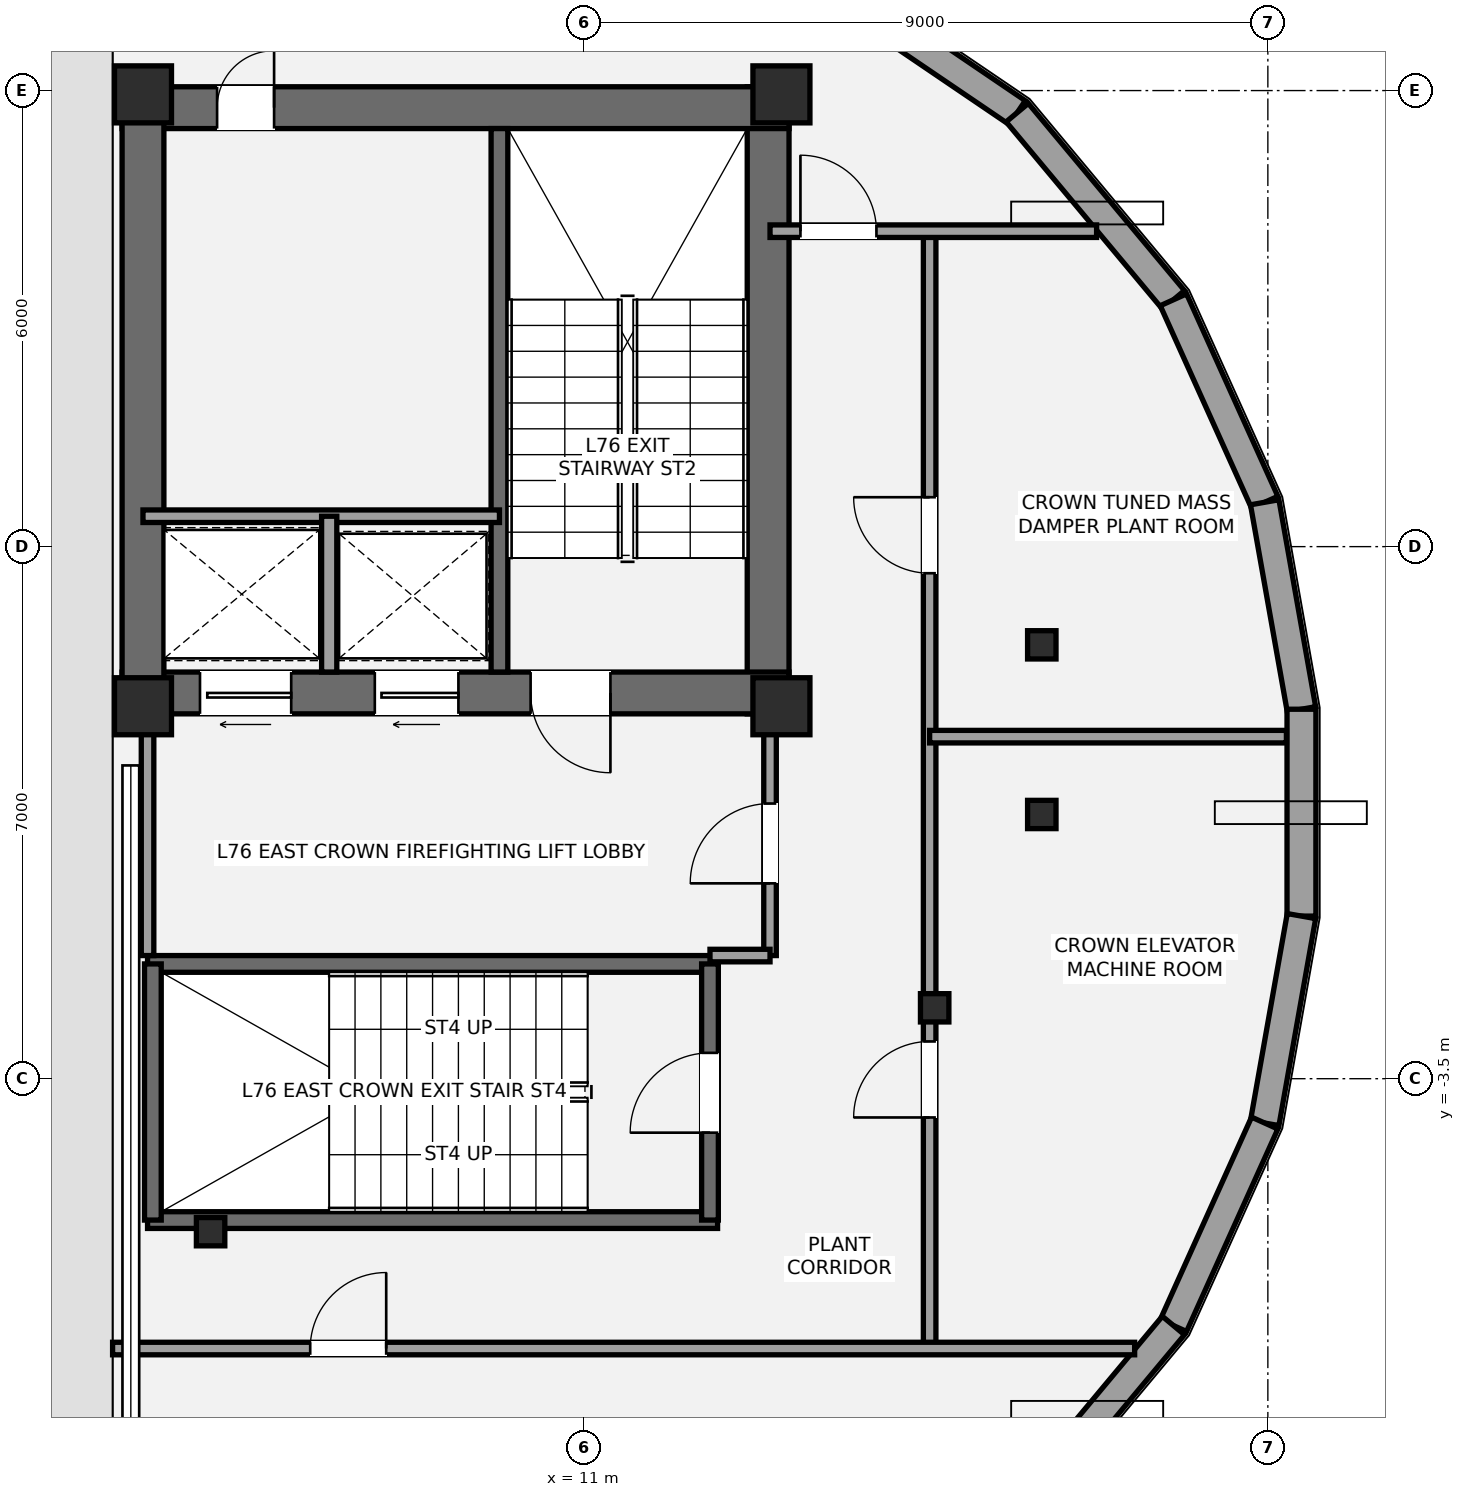
"""IFC4 building model, lengths in metres.
Left out: names, types, materials, properties, quantities, classifications, styles, units other than length and angle.
Written with IfcOpenShell. Run it as: python <this file> out.ifc"""

import sys

from ifc_helpers import new_model, si_unit, direction, frame, frame_2d, origin, origin_2d, place, context, subcontext, project, spatial, rectangle, i_section, extrude, element, fill, save


model = new_model("IFC4")
c1 = context("Model", 3, precision=1e-05, world=origin(), true_north=direction((0.0, 1.0)))
c2 = subcontext(c1, "Body", "Model", "MODEL_VIEW")
j1 = project(units=[si_unit("LENGTHUNIT", "METRE"), si_unit("PLANEANGLEUNIT", "RADIAN")], contexts=[c1])
p1 = place(None, origin())
s1 = spatial("IfcSite", under=j1, at=p1, CompositionType="ELEMENT")
p2 = place(p1, origin())
s2 = spatial("IfcBuilding", under=s1, at=p2, CompositionType="ELEMENT")
p3 = place(p2, frame((0.0, 0.0, 269.2)))
s3 = spatial("IfcBuildingStorey", under=s2, at=p3, CompositionType="ELEMENT", Elevation=269.2)
p4 = place(p3, frame((13.425, 1.3, 0.0), z_axis=(0.0, 0.0, 1.0), x_axis=(0.0, 1.0, 0.0)))
e1 = element("IfcWall", 1, at=p4, inside=s3, PredefinedType="SHEAR", context=c2, shape_type="SweptSolid", body=[
    extrude(rectangle(XDim=8.25, YDim=0.55, at=frame_2d((4.125, 0.0))), origin(), (0.0, 0.0, 1.0), 3.8),
])
p5 = place(p3, frame((4.925, 9.275, 0.0), z_axis=(0.0, 0.0, 1.0), x_axis=(1.0, 0.0, 0.0)))
e2 = element("IfcWall", 2, at=p5, inside=s3, PredefinedType="SHEAR", context=c2, shape_type="SweptSolid", body=[
    extrude(rectangle(XDim=8.775, YDim=0.55, at=frame_2d((4.387, 0.0))), origin(), (0.0, 0.0, 1.0), 3.8),
])
p6 = place(p5, frame((1.25, 0.0, 0.0)))
e3 = element("IfcOpeningElement", 3, at=p6, cuts=e2, PredefinedType="OPENING", context=c2, shape_type="SweptSolid", body=[
    extrude(rectangle(XDim=0.75, YDim=2.1, at=frame_2d((0.375, 1.05))), frame((0.0, 0.285, 0.0), z_axis=(0.0, -1.0, 0.0), x_axis=(1.0, 0.0, 0.0)), (0.0, 0.0, 1.0), 0.57),
])
p7 = place(p3, frame((13.7, 1.575, 0.0), z_axis=(0.0, 0.0, 1.0), x_axis=(-1.0, 0.0, 0.0)))
e4 = element("IfcWall", 4, at=p7, inside=s3, PredefinedType="SHEAR", context=c2, shape_type="SweptSolid", body=[
    extrude(rectangle(XDim=8.775, YDim=0.55, at=frame_2d((4.387, 0.0))), origin(), (0.0, 0.0, 1.0), 3.8),
])
p8 = place(p7, frame((2.35, 0.0, 0.0)))
e5 = element("IfcOpeningElement", 5, at=p8, cuts=e4, PredefinedType="OPENING", context=c2, shape_type="SweptSolid", body=[
    extrude(rectangle(XDim=1.05, YDim=2.15, at=frame_2d((0.525, 1.075))), frame((0.0, 0.285, 0.0), z_axis=(0.0, -1.0, 0.0), x_axis=(1.0, 0.0, 0.0)), (0.0, 0.0, 1.0), 0.57),
])
p9 = place(p7, frame((6.55, 0.0, 0.0)))
e6 = element("IfcOpeningElement", 6, at=p9, cuts=e4, PredefinedType="OPENING", context=c2, shape_type="SweptSolid", body=[
    extrude(rectangle(XDim=1.2, YDim=2.2, at=frame_2d((0.6, 1.1))), frame((0.0, 0.285, 0.0), z_axis=(0.0, -1.0, 0.0), x_axis=(1.0, 0.0, 0.0)), (0.0, 0.0, 1.0), 0.57),
])
p10 = place(p7, frame((4.35, 0.0, 0.0)))
e7 = element("IfcOpeningElement", 7, at=p10, cuts=e4, PredefinedType="OPENING", context=c2, shape_type="SweptSolid", body=[
    extrude(rectangle(XDim=1.1, YDim=2.2, at=frame_2d((0.55, 1.1))), frame((0.0, 0.285, 0.0), z_axis=(0.0, -1.0, 0.0), x_axis=(1.0, 0.0, 0.0)), (0.0, 0.0, 1.0), 0.57),
])
p11 = place(p3, frame((5.2, 1.3, 0.0), z_axis=(0.0, 0.0, 1.0), x_axis=(0.0, 1.0, 0.0)))
e8 = element("IfcWall", 8, at=p11, inside=s3, PredefinedType="SHEAR", context=c2, shape_type="SweptSolid", body=[
    extrude(rectangle(XDim=8.25, YDim=0.55, at=frame_2d((4.125, 0.0))), origin(), (0.0, 0.0, 1.0), 3.8),
])
p12 = place(p3, frame((9.89, 1.85, 0.0), z_axis=(0.0, 0.0, 1.0), x_axis=(0.0, 1.0, 0.0)))
e9 = element("IfcWall", 9, at=p12, inside=s3, PredefinedType="SHEAR", context=c2, shape_type="SweptSolid", body=[
    extrude(rectangle(XDim=7.15, YDim=0.22, at=frame_2d((3.575, 0.0))), origin(), (0.0, 0.0, 1.0), 3.8),
])
for number, where, z_axis, x_axis in (
    (10, (5.26, -1.99, 0.0), (0.0, 0.0, 1.0), (1.0, 0.0, 0.0)),
    (11, (5.26, -5.36, 0.0), (0.0, 0.0, 1.0), (1.0, 0.0, 0.0)),
):
    element("IfcWall", number, at=place(p3, frame(where, z_axis=z_axis, x_axis=x_axis)), inside=s3, PredefinedType="SHEAR", context=c2, shape_type="SweptSolid", body=[
        extrude(rectangle(XDim=7.5, YDim=0.22, at=frame_2d((3.75, 0.0))), origin(), (0.0, 0.0, 1.0), 3.8),
    ])
p13 = place(p3, frame((5.33, -5.36, 0.0), z_axis=(0.0, 0.0, 1.0), x_axis=(0.0, 1.0, 0.0)))
e12 = element("IfcWall", 12, at=p13, inside=s3, PredefinedType="SHEAR", context=c2, shape_type="SweptSolid", body=[
    extrude(rectangle(XDim=3.37, YDim=0.22, at=frame_2d((1.685, 0.0))), origin(), (0.0, 0.0, 1.0), 3.8),
])
p14 = place(p3, frame((12.66, -5.36, 0.0), z_axis=(0.0, 0.0, 1.0), x_axis=(0.0, 1.0, 0.0)))
e13 = element("IfcWall", 13, at=p14, inside=s3, PredefinedType="SHEAR", context=c2, shape_type="SweptSolid", body=[
    extrude(rectangle(XDim=3.37, YDim=0.22, at=frame_2d((1.685, 0.0))), origin(), (0.0, 0.0, 1.0), 3.8),
])
p15 = place(p14, frame((1.15, 0.0, 0.0)))
e14 = element("IfcOpeningElement", 14, at=p15, cuts=e13, PredefinedType="OPENING", context=c2, shape_type="SweptSolid", body=[
    extrude(rectangle(XDim=1.05, YDim=2.15, at=frame_2d((0.525, 1.075))), frame((0.0, 0.12, 0.0), z_axis=(0.0, -1.0, 0.0), x_axis=(1.0, 0.0, 0.0)), (0.0, 0.0, 1.0), 0.24),
])
for number, where, z_axis, x_axis in (
    (15, (5.2, 1.4, 0.0), (0.0, 0.0, 1.0), (1.0, 0.0, 0.0)),
    (16, (5.2, 9.45, 0.0), (0.0, 0.0, 1.0), (1.0, 0.0, 0.0)),
    (17, (13.6, 1.4, 0.0), (0.0, 0.0, 1.0), (1.0, 0.0, 0.0)),
    (18, (13.6, 9.45, 0.0), (0.0, 0.0, 1.0), (1.0, 0.0, 0.0)),
):
    element("IfcColumn", number, at=place(p3, frame(where, z_axis=z_axis, x_axis=x_axis)), inside=s3, PredefinedType="PILASTER", context=c2, shape_type="SweptSolid", body=[
        extrude(rectangle(XDim=0.75, YDim=0.75, at=origin_2d()), origin(), (0.0, 0.0, 1.0), 3.8),
    ])
for number, where, z_axis, x_axis in (
    (19, (17.026, 2.208, 0.0), (0.0, 0.0, 1.0), (1.0, 0.0, 0.0)),
    (20, (6.09, -5.513, 0.0), (0.0, 0.0, 1.0), (1.0, 0.0, 0.0)),
    (21, (15.616, -2.567, 0.0), (0.0, 0.0, 1.0), (1.0, 0.0, 0.0)),
    (22, (17.026, -0.024, 0.0), (0.0, 0.0, 1.0), (1.0, 0.0, 0.0)),
):
    element("IfcColumn", number, at=place(p3, frame(where, z_axis=z_axis, x_axis=x_axis)), inside=s3, PredefinedType="COLUMN", context=c2, shape_type="SweptSolid", body=[
        extrude(i_section(OverallWidth=0.374, OverallDepth=0.372, WebThickness=0.016, FlangeThickness=0.026, at=origin_2d()), origin(), (0.0, 0.0, 1.0), 3.8),
    ])
p16 = place(p3, frame((16.703, 9.21, 0.0), z_axis=(0.0, 0.0, 1.0), x_axis=(-0.827549057152, 0.56139340752, 0.0)))
e23 = element("IfcWall", 23, at=p16, inside=s3, PredefinedType="ELEMENTEDWALL", context=c2, shape_type="SweptSolid", body=[
    extrude(rectangle(XDim=3.593, YDim=0.38, at=frame_2d((1.796, 0.0))), origin(), (0.0, 0.0, 1.0), 2.97),
])
p17 = place(p3, frame((18.758, 6.748, 0.0), z_axis=(0.0, 0.0, 1.0), x_axis=(-0.640685893821, 0.76780309029, 0.0)))
e24 = element("IfcWall", 24, at=p17, inside=s3, PredefinedType="ELEMENTEDWALL", context=c2, shape_type="SweptSolid", body=[
    extrude(rectangle(XDim=3.207, YDim=0.38, at=frame_2d((1.604, 0.0))), origin(), (0.0, 0.0, 1.0), 2.97),
])
p18 = place(p3, frame((19.959, 4.083, 0.0), z_axis=(0.0, 0.0, 1.0), x_axis=(-0.411031522025, 0.911621131777, 0.0)))
e25 = element("IfcWall", 25, at=p18, inside=s3, PredefinedType="ELEMENTEDWALL", context=c2, shape_type="SweptSolid", body=[
    extrude(rectangle(XDim=2.922, YDim=0.38, at=frame_2d((1.461, 0.0))), origin(), (0.0, 0.0, 1.0), 2.97),
])
p19 = place(p3, frame((20.442, 1.361, 0.0), z_axis=(0.0, 0.0, 1.0), x_axis=(-0.174812712861, 0.984601703951, 0.0)))
e26 = element("IfcWall", 26, at=p19, inside=s3, PredefinedType="ELEMENTEDWALL", context=c2, shape_type="SweptSolid", body=[
    extrude(rectangle(XDim=2.765, YDim=0.38, at=frame_2d((1.383, 0.0))), origin(), (0.0, 0.0, 1.0), 2.97),
])
p20 = place(p3, frame((20.442, -1.361, 0.0), z_axis=(0.0, 0.0, 1.0), x_axis=(0.0, 1.0, 0.0)))
e27 = element("IfcWall", 27, at=p20, inside=s3, PredefinedType="ELEMENTEDWALL", context=c2, shape_type="SweptSolid", body=[
    extrude(rectangle(XDim=2.722, YDim=0.38, at=frame_2d((1.361, 0.0))), origin(), (0.0, 0.0, 1.0), 2.97),
])
p21 = place(p3, frame((19.959, -4.083, 0.0), z_axis=(0.0, 0.0, 1.0), x_axis=(0.174812712861, 0.984601703951, 0.0)))
e28 = element("IfcWall", 28, at=p21, inside=s3, PredefinedType="ELEMENTEDWALL", context=c2, shape_type="SweptSolid", body=[
    extrude(rectangle(XDim=2.765, YDim=0.38, at=frame_2d((1.383, 0.0))), origin(), (0.0, 0.0, 1.0), 2.97),
])
p22 = place(p3, frame((18.758, -6.748, 0.0), z_axis=(0.0, 0.0, 1.0), x_axis=(0.411031522025, 0.911621131777, 0.0)))
e29 = element("IfcWall", 29, at=p22, inside=s3, PredefinedType="ELEMENTEDWALL", context=c2, shape_type="SweptSolid", body=[
    extrude(rectangle(XDim=2.922, YDim=0.38, at=frame_2d((1.461, 0.0))), origin(), (0.0, 0.0, 1.0), 2.97),
])
p23 = place(p3, frame((16.703, -9.21, 0.0), z_axis=(0.0, 0.0, 1.0), x_axis=(0.640685893821, 0.76780309029, 0.0)))
e30 = element("IfcWall", 30, at=p23, inside=s3, PredefinedType="ELEMENTEDWALL", context=c2, shape_type="SweptSolid", body=[
    extrude(rectangle(XDim=3.207, YDim=0.38, at=frame_2d((1.604, 0.0))), origin(), (0.0, 0.0, 1.0), 2.97),
])
p24 = place(p3, frame((5.2, 3.9, 0.0), z_axis=(0.0, 0.0, 1.0), x_axis=(1.0, 0.0, 0.0)))
e31 = element("IfcWall", 31, at=p24, inside=s3, PredefinedType="PARTITIONING", context=c2, shape_type="SweptSolid", body=[
    extrude(rectangle(XDim=4.69, YDim=0.165, at=frame_2d((2.345, 0.0))), origin(), (0.0, 0.0, 1.0), 3.6),
])
p25 = place(p3, frame((7.65, 1.85, 0.0), z_axis=(0.0, 0.0, 1.0), x_axis=(0.0, 1.0, 0.0)))
e32 = element("IfcWall", 32, at=p25, inside=s3, PredefinedType="SOLIDWALL", context=c2, shape_type="SweptSolid", body=[
    extrude(rectangle(XDim=2.05, YDim=0.2, at=frame_2d((1.025, 0.0))), origin(), (0.0, 0.0, 1.0), 3.6),
])
p26 = place(p3, frame((5.26, -1.88, 0.0), z_axis=(0.0, 0.0, 1.0), x_axis=(0.0, 1.0, 0.0)))
e33 = element("IfcWall", 33, at=p26, inside=s3, PredefinedType="PARTITIONING", context=c2, shape_type="SweptSolid", body=[
    extrude(rectangle(XDim=3.23, YDim=0.165, at=frame_2d((1.615, 0.0))), origin(), (0.0, 0.0, 1.0), 3.6),
])
p27 = place(p3, frame((13.45, -1.88, 0.0), z_axis=(0.0, 0.0, 1.0), x_axis=(0.0, 1.0, 0.0)))
e34 = element("IfcWall", 34, at=p27, inside=s3, PredefinedType="PARTITIONING", context=c2, shape_type="SweptSolid", body=[
    extrude(rectangle(XDim=3.23, YDim=0.165, at=frame_2d((1.615, 0.0))), origin(), (0.0, 0.0, 1.0), 3.061),
])
p28 = place(p27, frame((0.95, 0.0, 0.0)))
e35 = element("IfcOpeningElement", 35, at=p28, cuts=e34, PredefinedType="OPENING", context=c2, shape_type="SweptSolid", body=[
    extrude(rectangle(XDim=1.05, YDim=2.15, at=frame_2d((0.525, 1.075))), frame((0.0, 0.093, 0.0), z_axis=(0.0, -1.0, 0.0), x_axis=(1.0, 0.0, 0.0)), (0.0, 0.0, 1.0), 0.185),
])
p29 = place(p3, frame((12.66, -1.88, 0.0), z_axis=(0.0, 0.0, 1.0), x_axis=(1.0, 0.0, 0.0)))
e36 = element("IfcWall", 36, at=p29, inside=s3, PredefinedType="PARTITIONING", context=c2, shape_type="SweptSolid", body=[
    extrude(rectangle(XDim=0.79, YDim=0.165, at=frame_2d((0.395, 0.0))), origin(), (0.0, 0.0, 1.0), 3.061),
])
p30 = place(p3, frame((15.55, -7.05, 0.0), z_axis=(0.0, 0.0, 1.0), x_axis=(0.0, 1.0, 0.0)))
e37 = element("IfcWall", 37, at=p30, inside=s3, PredefinedType="PARTITIONING", context=c2, shape_type="SweptSolid", body=[
    extrude(rectangle(XDim=14.7, YDim=0.165, at=frame_2d((7.35, 0.0))), origin(), (0.0, 0.0, 1.0), 2.987),
])
p31 = place(p30, frame((3.04, 0.0, 0.0)))
e38 = element("IfcOpeningElement", 38, at=p31, cuts=e37, PredefinedType="OPENING", context=c2, shape_type="SweptSolid", body=[
    extrude(rectangle(XDim=1.0, YDim=2.15, at=frame_2d((0.5, 1.075))), frame((0.0, 0.093, 0.0), z_axis=(0.0, -1.0, 0.0), x_axis=(1.0, 0.0, 0.0)), (0.0, 0.0, 1.0), 0.185),
])
p32 = place(p30, frame((10.2, 0.0, 0.0)))
e39 = element("IfcOpeningElement", 39, at=p32, cuts=e37, PredefinedType="OPENING", context=c2, shape_type="SweptSolid", body=[
    extrude(rectangle(XDim=1.0, YDim=2.15, at=frame_2d((0.5, 1.075))), frame((0.0, 0.093, 0.0), z_axis=(0.0, -1.0, 0.0), x_axis=(1.0, 0.0, 0.0)), (0.0, 0.0, 1.0), 0.185),
])
p33 = place(p3, frame((4.8, -7.05, 0.0), z_axis=(0.0, 0.0, 1.0), x_axis=(1.0, 0.0, 0.0)))
e40 = element("IfcWall", 40, at=p33, inside=s3, PredefinedType="PARTITIONING", context=c2, shape_type="SweptSolid", body=[
    extrude(rectangle(XDim=13.447, YDim=0.165, at=frame_2d((6.724, 0.0))), origin(), (0.0, 0.0, 1.0), 2.968),
])
p34 = place(p33, frame((2.6, 0.0, 0.0)))
e41 = element("IfcOpeningElement", 41, at=p34, cuts=e40, PredefinedType="OPENING", context=c2, shape_type="SweptSolid", body=[
    extrude(rectangle(XDim=1.0, YDim=2.15, at=frame_2d((0.5, 1.075))), frame((0.0, 0.093, 0.0), z_axis=(0.0, -1.0, 0.0), x_axis=(1.0, 0.0, 0.0)), (0.0, 0.0, 1.0), 0.185),
])
p35 = place(p3, frame((13.45, 7.65, 0.0), z_axis=(0.0, 0.0, 1.0), x_axis=(1.0, 0.0, 0.0)))
e42 = element("IfcWall", 42, at=p35, inside=s3, PredefinedType="PARTITIONING", context=c2, shape_type="SweptSolid", body=[
    extrude(rectangle(XDim=4.297, YDim=0.165, at=frame_2d((2.148, 0.0))), origin(), (0.0, 0.0, 1.0), 2.968),
])
p36 = place(p35, frame((0.4, 0.0, 0.0)))
e43 = element("IfcOpeningElement", 43, at=p36, cuts=e42, PredefinedType="OPENING", context=c2, shape_type="SweptSolid", body=[
    extrude(rectangle(XDim=1.0, YDim=2.15, at=frame_2d((0.5, 1.075))), frame((0.0, 0.093, 0.0), z_axis=(0.0, -1.0, 0.0), x_axis=(1.0, 0.0, 0.0)), (0.0, 0.0, 1.0), 0.185),
])
p37 = place(p3, frame((15.55, 1.0, 0.0), z_axis=(0.0, 0.0, 1.0), x_axis=(1.0, 0.0, 0.0)))
e44 = element("IfcWall", 44, at=p37, inside=s3, PredefinedType="PARTITIONING", context=c2, shape_type="SweptSolid", body=[
    extrude(rectangle(XDim=4.694, YDim=0.165, at=frame_2d((2.347, 0.0))), origin(), (0.0, 0.0, 1.0), 3.061),
])
p38 = place(p28, origin())
e45 = element("IfcDoor", 45, at=p38, inside=s3, OperationType="SINGLE_SWING_LEFT", PredefinedType="DOOR", context=c2, shape_type="SweptSolid", body=[
    extrude(rectangle(XDim=1.05, YDim=2.15, at=frame_2d((0.525, 1.075))), frame((0.0, 0.025, 0.0), z_axis=(0.0, -1.0, 0.0), x_axis=(1.0, 0.0, 0.0)), (0.0, 0.0, 1.0), 0.05),
])
fill(e35, e45)
p39 = place(p8, origin())
e46 = element("IfcDoor", 46, at=p39, inside=s3, OperationType="SINGLE_SWING_LEFT", PredefinedType="DOOR", context=c2, shape_type="SweptSolid", body=[
    extrude(rectangle(XDim=1.05, YDim=2.15, at=frame_2d((0.525, 1.075))), frame((0.0, 0.025, 0.0), z_axis=(0.0, -1.0, 0.0), x_axis=(1.0, 0.0, 0.0)), (0.0, 0.0, 1.0), 0.05),
])
fill(e5, e46)
p40 = place(p15, origin())
e47 = element("IfcDoor", 47, at=p40, inside=s3, OperationType="SINGLE_SWING_LEFT", PredefinedType="DOOR", context=c2, shape_type="SweptSolid", body=[
    extrude(rectangle(XDim=1.05, YDim=2.15, at=frame_2d((0.525, 1.075))), frame((0.0, 0.025, 0.0), z_axis=(0.0, -1.0, 0.0), x_axis=(1.0, 0.0, 0.0)), (0.0, 0.0, 1.0), 0.05),
])
fill(e14, e47)
p41 = place(p6, origin())
e48 = element("IfcDoor", 48, at=p41, inside=s3, OperationType="SINGLE_SWING_RIGHT", PredefinedType="DOOR", context=c2, shape_type="SweptSolid", body=[
    extrude(rectangle(XDim=0.75, YDim=2.1, at=frame_2d((0.375, 1.05))), frame((0.0, 0.025, 0.0), z_axis=(0.0, -1.0, 0.0), x_axis=(1.0, 0.0, 0.0)), (0.0, 0.0, 1.0), 0.05),
])
fill(e3, e48)
p42 = place(p9, origin())
e49 = element("IfcDoor", 49, at=p42, inside=s3, OperationType="SLIDING_TO_RIGHT", PredefinedType="DOOR", context=c2, shape_type="SweptSolid", body=[
    extrude(rectangle(XDim=1.2, YDim=2.2, at=frame_2d((0.6, 1.1))), frame((0.0, 0.025, 0.0), z_axis=(0.0, -1.0, 0.0), x_axis=(1.0, 0.0, 0.0)), (0.0, 0.0, 1.0), 0.05),
])
fill(e6, e49)
p43 = place(p10, origin())
e50 = element("IfcDoor", 50, at=p43, inside=s3, OperationType="SLIDING_TO_LEFT", PredefinedType="DOOR", context=c2, shape_type="SweptSolid", body=[
    extrude(rectangle(XDim=1.1, YDim=2.2, at=frame_2d((0.55, 1.1))), frame((0.0, 0.025, 0.0), z_axis=(0.0, -1.0, 0.0), x_axis=(1.0, 0.0, 0.0)), (0.0, 0.0, 1.0), 0.05),
])
fill(e7, e50)
p44 = place(p36, origin())
e51 = element("IfcDoor", 51, at=p44, inside=s3, OperationType="SINGLE_SWING_LEFT", PredefinedType="DOOR", context=c2, shape_type="SweptSolid", body=[
    extrude(rectangle(XDim=1.0, YDim=2.15, at=frame_2d((0.5, 1.075))), frame((0.0, 0.025, 0.0), z_axis=(0.0, -1.0, 0.0), x_axis=(1.0, 0.0, 0.0)), (0.0, 0.0, 1.0), 0.05),
])
fill(e43, e51)
p45 = place(p34, origin())
e52 = element("IfcDoor", 52, at=p45, inside=s3, OperationType="SINGLE_SWING_RIGHT", PredefinedType="DOOR", context=c2, shape_type="SweptSolid", body=[
    extrude(rectangle(XDim=1.0, YDim=2.15, at=frame_2d((0.5, 1.075))), frame((0.0, 0.025, 0.0), z_axis=(0.0, -1.0, 0.0), x_axis=(1.0, 0.0, 0.0)), (0.0, 0.0, 1.0), 0.05),
])
fill(e41, e52)
p46 = place(p31, origin())
e53 = element("IfcDoor", 53, at=p46, inside=s3, OperationType="SINGLE_SWING_LEFT", PredefinedType="DOOR", context=c2, shape_type="SweptSolid", body=[
    extrude(rectangle(XDim=1.0, YDim=2.15, at=frame_2d((0.5, 1.075))), frame((0.0, 0.025, 0.0), z_axis=(0.0, -1.0, 0.0), x_axis=(1.0, 0.0, 0.0)), (0.0, 0.0, 1.0), 0.05),
])
fill(e38, e53)
p47 = place(p32, origin())
e54 = element("IfcDoor", 54, at=p47, inside=s3, OperationType="SINGLE_SWING_RIGHT", PredefinedType="DOOR", context=c2, shape_type="SweptSolid", body=[
    extrude(rectangle(XDim=1.0, YDim=2.15, at=frame_2d((0.5, 1.075))), frame((0.0, 0.025, 0.0), z_axis=(0.0, -1.0, 0.0), x_axis=(1.0, 0.0, 0.0)), (0.0, 0.0, 1.0), 0.05),
])
fill(e39, e54)
save(model, sys.argv[1])
